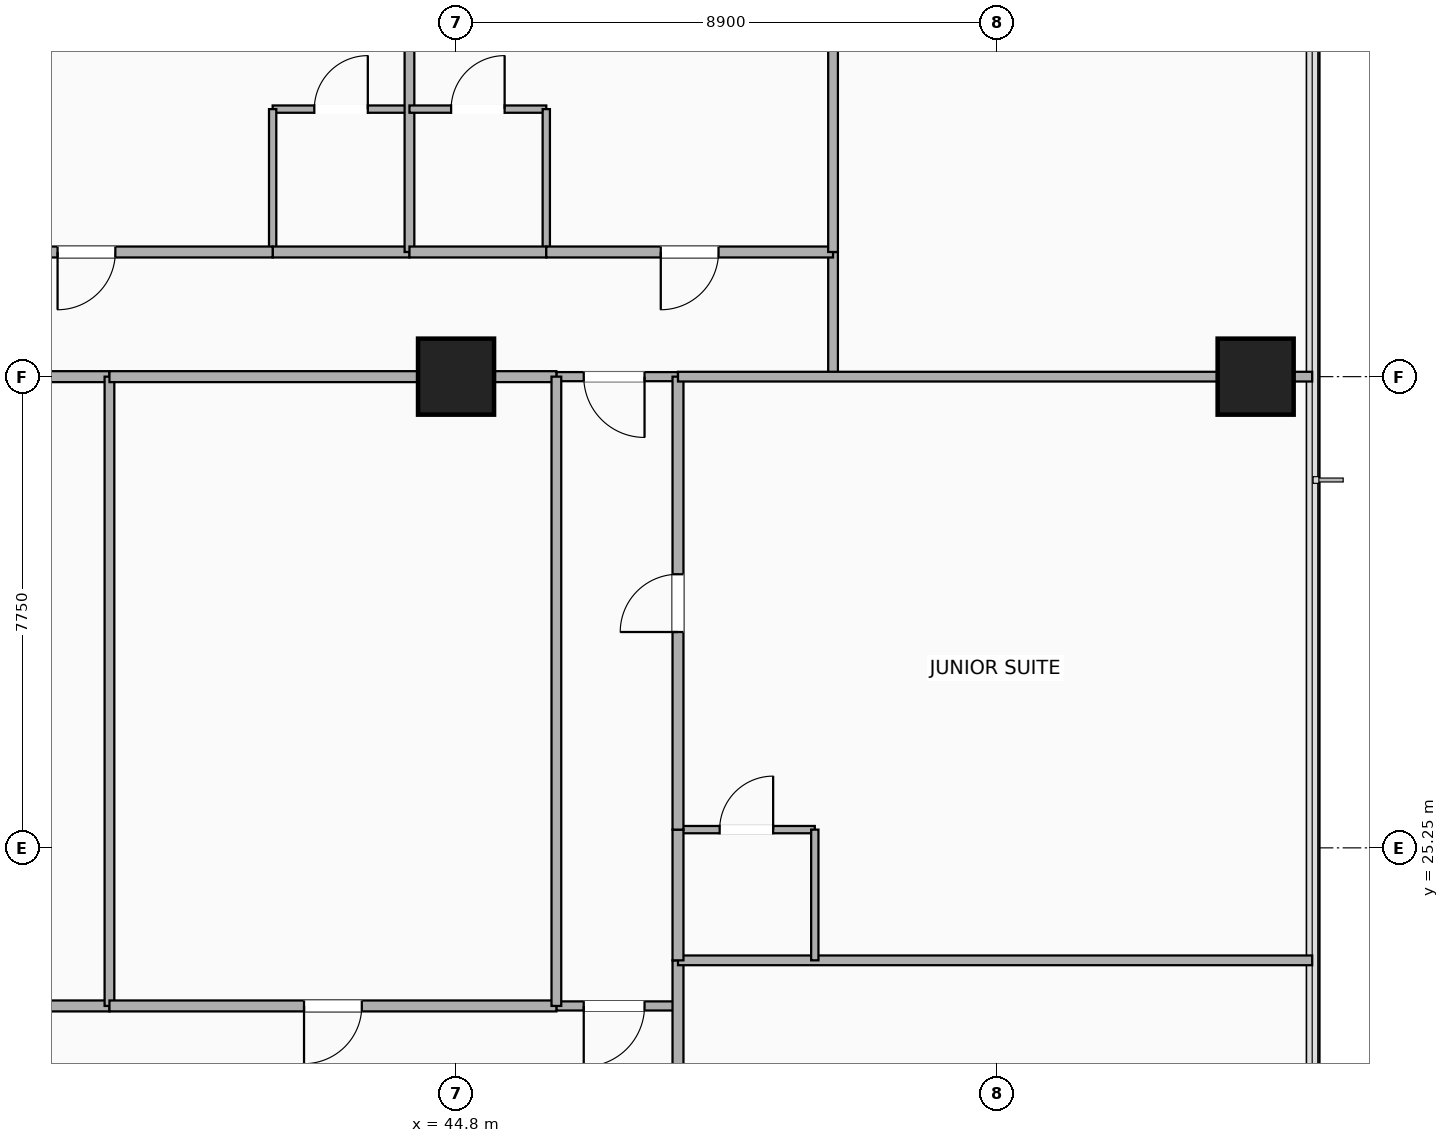
"""IFC4 building model, lengths in metres.
Left out: names, types, materials, properties, quantities, classifications, styles, units other than length and angle.
Written with IfcOpenShell. Run it as: python <this file> out.ifc"""

import sys

from ifc_helpers import new_model, si_unit, direction, frame, frame_2d, origin, origin_2d, place, context, subcontext, project, spatial, rectangle, extrude, element, fill, save


model = new_model("IFC4")
c1 = context("Model", 3, precision=1e-05, world=origin(), true_north=direction((0.0, 1.0)))
c2 = subcontext(c1, "Body", "Model", "MODEL_VIEW")
j1 = project(units=[si_unit("LENGTHUNIT", "METRE"), si_unit("PLANEANGLEUNIT", "RADIAN")], contexts=[c1])
p1 = place(None, origin())
s1 = spatial("IfcSite", under=j1, at=p1, CompositionType="ELEMENT")
p2 = place(p1, origin())
s2 = spatial("IfcBuilding", under=s1, at=p2, CompositionType="ELEMENT")
p3 = place(p2, frame((0.0, 0.0, 98.7)))
s3 = spatial("IfcBuildingStorey", under=s2, at=p3, CompositionType="ELEMENT", Elevation=98.7)
for number, where, z_axis, x_axis in (
    (1, (44.8, 33.0, -0.26), (0.0, 0.0, 1.0), (1.0, 0.0, 0.0)),
    (2, (57.95, 33.0, -0.26), (0.0, 0.0, 1.0), (1.0, 0.0, 0.0)),
):
    element("IfcColumn", number, at=place(p3, frame(where, z_axis=z_axis, x_axis=x_axis)), inside=s3, PredefinedType="COLUMN", context=c2, shape_type="SweptSolid", body=[
        extrude(rectangle(XDim=1.25, YDim=1.25, at=origin_2d()), origin(), (0.0, 0.0, 1.0), 3.5),
    ])
p4 = place(p3, frame((46.45, 22.65, 0.0), z_axis=(0.0, 0.0, 1.0), x_axis=(1.0, 0.0, 0.0)))
e3 = element("IfcWall", 3, at=p4, inside=s3, PredefinedType="PARTITIONING", context=c2, shape_type="SweptSolid", body=[
    extrude(rectangle(XDim=2.0, YDim=0.15, at=frame_2d((1.0, 0.0))), origin(), (0.0, 0.0, 1.0), 3.24),
])
p5 = place(p4, frame((0.45, 0.0, 0.0)))
e4 = element("IfcOpeningElement", 4, at=p5, cuts=e3, PredefinedType="OPENING", context=c2, shape_type="SweptSolid", body=[
    extrude(rectangle(XDim=1.0, YDim=2.15, at=frame_2d((0.5, 1.075))), frame((0.0, 0.085, 0.0), z_axis=(0.0, -1.0, 0.0), x_axis=(1.0, 0.0, 0.0)), (0.0, 0.0, 1.0), 0.17),
])
p6 = place(p3, frame((46.45, 33.0, 0.0), z_axis=(0.0, 0.0, 1.0), x_axis=(1.0, 0.0, 0.0)))
e5 = element("IfcWall", 5, at=p6, inside=s3, PredefinedType="PARTITIONING", context=c2, shape_type="SweptSolid", body=[
    extrude(rectangle(XDim=2.0, YDim=0.15, at=frame_2d((1.0, 0.0))), origin(), (0.0, 0.0, 1.0), 2.313),
])
p7 = place(p6, frame((0.45, 0.0, 0.0)))
e6 = element("IfcOpeningElement", 6, at=p7, cuts=e5, PredefinedType="OPENING", context=c2, shape_type="SweptSolid", body=[
    extrude(rectangle(XDim=1.0, YDim=2.15, at=frame_2d((0.5, 1.075))), frame((0.0, 0.085, 0.0), z_axis=(0.0, -1.0, 0.0), x_axis=(1.0, 0.0, 0.0)), (0.0, 0.0, 1.0), 0.17),
])
p8 = place(p3, frame((51.0, 33.0, 0.0), z_axis=(0.0, 0.0, 1.0), x_axis=(0.0, 1.0, 0.0)))
e7 = element("IfcWall", 7, at=p8, inside=s3, PredefinedType="PARTITIONING", context=c2, shape_type="SweptSolid", body=[
    extrude(rectangle(XDim=2.05, YDim=0.16, at=frame_2d((1.025, 0.0))), origin(), (0.0, 0.0, 1.0), 2.313),
])
p9 = place(p3, frame((33.4, 22.65, 0.0), z_axis=(0.0, 0.0, 1.0), x_axis=(1.0, 0.0, 0.0)))
e8 = element("IfcWall", 8, at=p9, inside=s3, PredefinedType="PARTITIONING", context=c2, shape_type="SweptSolid", body=[
    extrude(rectangle(XDim=5.7, YDim=0.18, at=frame_2d((2.85, 0.0))), origin(), (0.0, 0.0, 1.0), 2.313),
])
p10 = place(p9, frame((2.375, 0.0, 0.0)))
e9 = element("IfcOpeningElement", 9, at=p10, cuts=e8, PredefinedType="OPENING", context=c2, shape_type="SweptSolid", body=[
    extrude(rectangle(XDim=0.95, YDim=2.15, at=frame_2d((0.475, 1.075))), frame((0.0, 0.1, 0.0), z_axis=(0.0, -1.0, 0.0), x_axis=(1.0, 0.0, 0.0)), (0.0, 0.0, 1.0), 0.2),
])
p11 = place(p3, frame((33.4, 33.0, 0.0), z_axis=(0.0, 0.0, 1.0), x_axis=(1.0, 0.0, 0.0)))
e10 = element("IfcWall", 10, at=p11, inside=s3, PredefinedType="PARTITIONING", context=c2, shape_type="SweptSolid", body=[
    extrude(rectangle(XDim=5.7, YDim=0.18, at=frame_2d((2.85, 0.0))), origin(), (0.0, 0.0, 1.0), 2.313),
])
p12 = place(p3, frame((39.1, 22.65, 0.0), z_axis=(0.0, 0.0, 1.0), x_axis=(0.0, 1.0, 0.0)))
e11 = element("IfcWall", 11, at=p12, inside=s3, PredefinedType="PARTITIONING", context=c2, shape_type="SweptSolid", body=[
    extrude(rectangle(XDim=10.35, YDim=0.16, at=frame_2d((5.175, 0.0))), origin(), (0.0, 0.0, 1.0), 2.614),
])
p13 = place(p3, frame((39.1, 22.65, 0.0), z_axis=(0.0, 0.0, 1.0), x_axis=(1.0, 0.0, 0.0)))
e12 = element("IfcWall", 12, at=p13, inside=s3, PredefinedType="PARTITIONING", context=c2, shape_type="SweptSolid", body=[
    extrude(rectangle(XDim=7.35, YDim=0.18, at=frame_2d((3.675, 0.0))), origin(), (0.0, 0.0, 1.0), 2.313),
])
p14 = place(p13, frame((3.2, 0.0, 0.0)))
e13 = element("IfcOpeningElement", 13, at=p14, cuts=e12, PredefinedType="OPENING", context=c2, shape_type="SweptSolid", body=[
    extrude(rectangle(XDim=0.95, YDim=2.15, at=frame_2d((0.475, 1.075))), frame((0.0, 0.1, 0.0), z_axis=(0.0, -1.0, 0.0), x_axis=(1.0, 0.0, 0.0)), (0.0, 0.0, 1.0), 0.2),
])
p15 = place(p3, frame((39.1, 33.0, 0.0), z_axis=(0.0, 0.0, 1.0), x_axis=(1.0, 0.0, 0.0)))
e14 = element("IfcWall", 14, at=p15, inside=s3, PredefinedType="PARTITIONING", context=c2, shape_type="SweptSolid", body=[
    extrude(rectangle(XDim=7.35, YDim=0.18, at=frame_2d((3.675, 0.0))), origin(), (0.0, 0.0, 1.0), 2.313),
])
p16 = place(p3, frame((46.45, 22.65, 0.0), z_axis=(0.0, 0.0, 1.0), x_axis=(0.0, 1.0, 0.0)))
e15 = element("IfcWall", 15, at=p16, inside=s3, PredefinedType="PARTITIONING", context=c2, shape_type="SweptSolid", body=[
    extrude(rectangle(XDim=10.35, YDim=0.16, at=frame_2d((5.175, 0.0))), origin(), (0.0, 0.0, 1.0), 2.313),
])
p17 = place(p3, frame((41.784, 37.4, 0.0), z_axis=(0.0, 0.0, 1.0), x_axis=(1.0, 0.0, 0.0)))
e16 = element("IfcWall", 16, at=p17, inside=s3, PredefinedType="PARTITIONING", context=c2, shape_type="SweptSolid", body=[
    extrude(rectangle(XDim=2.25, YDim=0.12, at=frame_2d((1.125, 0.0))), origin(), (0.0, 0.0, 1.0), 3.24),
])
p18 = place(p17, frame((1.565, 0.0, 0.0), z_axis=(0.0, 0.0, 1.0), x_axis=(-1.0, 0.0, 0.0)))
e17 = element("IfcOpeningElement", 17, at=p18, cuts=e16, PredefinedType="OPENING", context=c2, shape_type="SweptSolid", body=[
    extrude(rectangle(XDim=0.88, YDim=2.08, at=frame_2d((0.44, 1.04))), frame((0.0, 0.07, 0.0), z_axis=(0.0, -1.0, 0.0), x_axis=(1.0, 0.0, 0.0)), (0.0, 0.0, 1.0), 0.14),
])
p19 = place(p3, frame((41.784, 35.05, 0.0), z_axis=(0.0, 0.0, 1.0), x_axis=(0.0, 1.0, 0.0)))
e18 = element("IfcWall", 18, at=p19, inside=s3, PredefinedType="PARTITIONING", context=c2, shape_type="SweptSolid", body=[
    extrude(rectangle(XDim=2.35, YDim=0.12, at=frame_2d((1.175, 0.0))), origin(), (0.0, 0.0, 1.0), 2.922),
])
p20 = place(p3, frame((41.784, 35.05, 0.0), z_axis=(0.0, 0.0, 1.0), x_axis=(1.0, 0.0, 0.0)))
e19 = element("IfcWall", 19, at=p20, inside=s3, PredefinedType="PARTITIONING", context=c2, shape_type="SweptSolid", body=[
    extrude(rectangle(XDim=2.25, YDim=0.18, at=frame_2d((1.125, 0.0))), origin(), (0.0, 0.0, 1.0), 3.24),
])
p21 = place(p3, frame((35.66, 35.05, 0.0), z_axis=(0.0, 0.0, 1.0), x_axis=(1.0, 0.0, 0.0)))
e20 = element("IfcWall", 20, at=p21, inside=s3, PredefinedType="PARTITIONING", context=c2, shape_type="SweptSolid", body=[
    extrude(rectangle(XDim=6.124, YDim=0.18, at=frame_2d((3.062, 0.0))), origin(), (0.0, 0.0, 1.0), 2.313),
])
p22 = place(p21, frame((2.587, 0.0, 0.0)))
e21 = element("IfcOpeningElement", 21, at=p22, cuts=e20, PredefinedType="OPENING", context=c2, shape_type="SweptSolid", body=[
    extrude(rectangle(XDim=0.95, YDim=2.15, at=frame_2d((0.475, 1.075))), frame((0.0, 0.1, 0.0), z_axis=(0.0, -1.0, 0.0), x_axis=(1.0, 0.0, 0.0)), (0.0, 0.0, 1.0), 0.2),
])
p23 = place(p3, frame((44.034, 35.05, 0.0), z_axis=(0.0, 0.0, 1.0), x_axis=(0.0, 1.0, 0.0)))
e22 = element("IfcWall", 22, at=p23, inside=s3, PredefinedType="PARTITIONING", context=c2, shape_type="SweptSolid", body=[
    extrude(rectangle(XDim=11.33, YDim=0.16, at=frame_2d((5.665, 0.0))), origin(), (0.0, 0.0, 1.0), 2.603),
])
p24 = place(p3, frame((44.034, 37.4, 0.0), z_axis=(0.0, 0.0, 1.0), x_axis=(1.0, 0.0, 0.0)))
e23 = element("IfcWall", 23, at=p24, inside=s3, PredefinedType="PARTITIONING", context=c2, shape_type="SweptSolid", body=[
    extrude(rectangle(XDim=2.25, YDim=0.12, at=frame_2d((1.125, 0.0))), origin(), (0.0, 0.0, 1.0), 2.313),
])
p25 = place(p24, frame((1.565, 0.0, 0.0), z_axis=(0.0, 0.0, 1.0), x_axis=(-1.0, 0.0, 0.0)))
e24 = element("IfcOpeningElement", 24, at=p25, cuts=e23, PredefinedType="OPENING", context=c2, shape_type="SweptSolid", body=[
    extrude(rectangle(XDim=0.88, YDim=2.08, at=frame_2d((0.44, 1.04))), frame((0.0, 0.07, 0.0), z_axis=(0.0, -1.0, 0.0), x_axis=(1.0, 0.0, 0.0)), (0.0, 0.0, 1.0), 0.14),
])
p26 = place(p3, frame((46.284, 35.05, 0.0), z_axis=(0.0, 0.0, 1.0), x_axis=(0.0, 1.0, 0.0)))
e25 = element("IfcWall", 25, at=p26, inside=s3, PredefinedType="PARTITIONING", context=c2, shape_type="SweptSolid", body=[
    extrude(rectangle(XDim=2.35, YDim=0.12, at=frame_2d((1.175, 0.0))), origin(), (0.0, 0.0, 1.0), 3.24),
])
p27 = place(p3, frame((44.034, 35.05, 0.0), z_axis=(0.0, 0.0, 1.0), x_axis=(1.0, 0.0, 0.0)))
e26 = element("IfcWall", 26, at=p27, inside=s3, PredefinedType="PARTITIONING", context=c2, shape_type="SweptSolid", body=[
    extrude(rectangle(XDim=2.25, YDim=0.18, at=frame_2d((1.125, 0.0))), origin(), (0.0, 0.0, 1.0), 2.313),
])
p28 = place(p3, frame((46.284, 35.05, 0.0), z_axis=(0.0, 0.0, 1.0), x_axis=(1.0, 0.0, 0.0)))
e27 = element("IfcWall", 27, at=p28, inside=s3, PredefinedType="PARTITIONING", context=c2, shape_type="SweptSolid", body=[
    extrude(rectangle(XDim=4.716, YDim=0.18, at=frame_2d((2.358, 0.0))), origin(), (0.0, 0.0, 1.0), 3.24),
])
p29 = place(p28, frame((1.883, 0.0, 0.0)))
e28 = element("IfcOpeningElement", 28, at=p29, cuts=e27, PredefinedType="OPENING", context=c2, shape_type="SweptSolid", body=[
    extrude(rectangle(XDim=0.95, YDim=2.15, at=frame_2d((0.475, 1.075))), frame((0.0, 0.1, 0.0), z_axis=(0.0, -1.0, 0.0), x_axis=(1.0, 0.0, 0.0)), (0.0, 0.0, 1.0), 0.2),
])
p30 = place(p3, frame((51.0, 35.05, 0.0), z_axis=(0.0, 0.0, 1.0), x_axis=(0.0, 1.0, 0.0)))
e29 = element("IfcWall", 29, at=p30, inside=s3, PredefinedType="PARTITIONING", context=c2, shape_type="SweptSolid", body=[
    extrude(rectangle(XDim=11.33, YDim=0.16, at=frame_2d((5.665, 0.0))), origin(), (0.0, 0.0, 1.0), 3.24),
])
p31 = place(p3, frame((48.45, 15.95, 0.0), z_axis=(0.0, 0.0, 1.0), x_axis=(0.0, 1.0, 0.0)))
e30 = element("IfcWall", 30, at=p31, inside=s3, PredefinedType="PARTITIONING", context=c2, shape_type="SweptSolid", body=[
    extrude(rectangle(XDim=7.45, YDim=0.18, at=frame_2d((3.725, 0.0))), origin(), (0.0, 0.0, 1.0), 2.313),
])
p32 = place(p31, frame((4.2, 0.0, 0.0), z_axis=(0.0, 0.0, 1.0), x_axis=(-1.0, 0.0, 0.0)))
e31 = element("IfcOpeningElement", 31, at=p32, cuts=e30, PredefinedType="OPENING", context=c2, shape_type="SweptSolid", body=[
    extrude(rectangle(XDim=0.95, YDim=2.15, at=frame_2d((0.475, 1.075))), frame((0.0, 0.1, 0.0), z_axis=(0.0, -1.0, 0.0), x_axis=(1.0, 0.0, 0.0)), (0.0, 0.0, 1.0), 0.2),
])
p33 = place(p3, frame((48.45, 23.4, 0.0), z_axis=(0.0, 0.0, 1.0), x_axis=(1.0, 0.0, 0.0)))
e32 = element("IfcWall", 32, at=p33, inside=s3, PredefinedType="PARTITIONING", context=c2, shape_type="SweptSolid", body=[
    extrude(rectangle(XDim=10.43, YDim=0.16, at=frame_2d((5.215, 0.0))), origin(), (0.0, 0.0, 1.0), 2.603),
])
p34 = place(p3, frame((48.45, 25.55, 0.0), z_axis=(0.0, 0.0, 1.0), x_axis=(1.0, 0.0, 0.0)))
e33 = element("IfcWall", 33, at=p34, inside=s3, PredefinedType="PARTITIONING", context=c2, shape_type="SweptSolid", body=[
    extrude(rectangle(XDim=2.25, YDim=0.12, at=frame_2d((1.125, 0.0))), origin(), (0.0, 0.0, 1.0), 3.24),
])
p35 = place(p34, frame((1.565, 0.0, 0.0), z_axis=(0.0, 0.0, 1.0), x_axis=(-1.0, 0.0, 0.0)))
e34 = element("IfcOpeningElement", 34, at=p35, cuts=e33, PredefinedType="OPENING", context=c2, shape_type="SweptSolid", body=[
    extrude(rectangle(XDim=0.88, YDim=2.08, at=frame_2d((0.44, 1.04))), frame((0.0, 0.07, 0.0), z_axis=(0.0, -1.0, 0.0), x_axis=(1.0, 0.0, 0.0)), (0.0, 0.0, 1.0), 0.14),
])
p36 = place(p3, frame((50.7, 23.4, 0.0), z_axis=(0.0, 0.0, 1.0), x_axis=(0.0, 1.0, 0.0)))
e35 = element("IfcWall", 35, at=p36, inside=s3, PredefinedType="PARTITIONING", context=c2, shape_type="SweptSolid", body=[
    extrude(rectangle(XDim=2.15, YDim=0.12, at=frame_2d((1.075, 0.0))), origin(), (0.0, 0.0, 1.0), 2.818),
])
p37 = place(p3, frame((48.45, 23.4, 0.0), z_axis=(0.0, 0.0, 1.0), x_axis=(0.0, 1.0, 0.0)))
e36 = element("IfcWall", 36, at=p37, inside=s3, PredefinedType="PARTITIONING", context=c2, shape_type="SweptSolid", body=[
    extrude(rectangle(XDim=2.15, YDim=0.18, at=frame_2d((1.075, 0.0))), origin(), (0.0, 0.0, 1.0), 2.818),
])
p38 = place(p3, frame((48.45, 25.55, 0.0), z_axis=(0.0, 0.0, 1.0), x_axis=(0.0, 1.0, 0.0)))
e37 = element("IfcWall", 37, at=p38, inside=s3, PredefinedType="PARTITIONING", context=c2, shape_type="SweptSolid", body=[
    extrude(rectangle(XDim=7.45, YDim=0.18, at=frame_2d((3.725, 0.0))), origin(), (0.0, 0.0, 1.0), 2.313),
])
p39 = place(p38, frame((4.2, 0.0, 0.0), z_axis=(0.0, 0.0, 1.0), x_axis=(-1.0, 0.0, 0.0)))
e38 = element("IfcOpeningElement", 38, at=p39, cuts=e37, PredefinedType="OPENING", context=c2, shape_type="SweptSolid", body=[
    extrude(rectangle(XDim=0.95, YDim=2.15, at=frame_2d((0.475, 1.075))), frame((0.0, 0.1, 0.0), z_axis=(0.0, -1.0, 0.0), x_axis=(1.0, 0.0, 0.0)), (0.0, 0.0, 1.0), 0.2),
])
p40 = place(p3, frame((48.45, 33.0, 0.0), z_axis=(0.0, 0.0, 1.0), x_axis=(1.0, 0.0, 0.0)))
e39 = element("IfcWall", 39, at=p40, inside=s3, PredefinedType="PARTITIONING", context=c2, shape_type="SweptSolid", body=[
    extrude(rectangle(XDim=10.43, YDim=0.16, at=frame_2d((5.215, 0.0))), origin(), (0.0, 0.0, 1.0), 2.313),
])
p41 = place(p5, origin())
e40 = element("IfcDoor", 40, at=p41, inside=s3, OperationType="SINGLE_SWING_LEFT", PredefinedType="DOOR", context=c2, shape_type="SweptSolid", body=[
    extrude(rectangle(XDim=1.0, YDim=2.15, at=frame_2d((0.5, 1.075))), frame((0.0, 0.025, 0.0), z_axis=(0.0, -1.0, 0.0), x_axis=(1.0, 0.0, 0.0)), (0.0, 0.0, 1.0), 0.05),
])
fill(e4, e40)
p42 = place(p7, origin())
e41 = element("IfcDoor", 41, at=p42, inside=s3, OperationType="SINGLE_SWING_RIGHT", PredefinedType="DOOR", context=c2, shape_type="SweptSolid", body=[
    extrude(rectangle(XDim=1.0, YDim=2.15, at=frame_2d((0.5, 1.075))), frame((0.0, 0.025, 0.0), z_axis=(0.0, -1.0, 0.0), x_axis=(1.0, 0.0, 0.0)), (0.0, 0.0, 1.0), 0.05),
])
fill(e6, e41)
p43 = place(p14, origin())
e42 = element("IfcDoor", 42, at=p43, inside=s3, OperationType="SINGLE_SWING_LEFT", PredefinedType="DOOR", context=c2, shape_type="SweptSolid", body=[
    extrude(rectangle(XDim=0.95, YDim=2.15, at=frame_2d((0.475, 1.075))), frame((0.0, 0.025, 0.0), z_axis=(0.0, -1.0, 0.0), x_axis=(1.0, 0.0, 0.0)), (0.0, 0.0, 1.0), 0.05),
])
fill(e13, e42)
p44 = place(p18, origin())
e43 = element("IfcDoor", 43, at=p44, inside=s3, OperationType="SINGLE_SWING_RIGHT", PredefinedType="DOOR", context=c2, shape_type="SweptSolid", body=[
    extrude(rectangle(XDim=0.88, YDim=2.08, at=frame_2d((0.44, 1.04))), frame((0.0, 0.025, 0.0), z_axis=(0.0, -1.0, 0.0), x_axis=(1.0, 0.0, 0.0)), (0.0, 0.0, 1.0), 0.05),
])
fill(e17, e43)
p45 = place(p22, origin())
e44 = element("IfcDoor", 44, at=p45, inside=s3, OperationType="SINGLE_SWING_LEFT", PredefinedType="DOOR", context=c2, shape_type="SweptSolid", body=[
    extrude(rectangle(XDim=0.95, YDim=2.15, at=frame_2d((0.475, 1.075))), frame((0.0, 0.025, 0.0), z_axis=(0.0, -1.0, 0.0), x_axis=(1.0, 0.0, 0.0)), (0.0, 0.0, 1.0), 0.05),
])
fill(e21, e44)
p46 = place(p25, origin())
e45 = element("IfcDoor", 45, at=p46, inside=s3, OperationType="SINGLE_SWING_RIGHT", PredefinedType="DOOR", context=c2, shape_type="SweptSolid", body=[
    extrude(rectangle(XDim=0.88, YDim=2.08, at=frame_2d((0.44, 1.04))), frame((0.0, 0.025, 0.0), z_axis=(0.0, -1.0, 0.0), x_axis=(1.0, 0.0, 0.0)), (0.0, 0.0, 1.0), 0.05),
])
fill(e24, e45)
p47 = place(p29, origin())
e46 = element("IfcDoor", 46, at=p47, inside=s3, OperationType="SINGLE_SWING_LEFT", PredefinedType="DOOR", context=c2, shape_type="SweptSolid", body=[
    extrude(rectangle(XDim=0.95, YDim=2.15, at=frame_2d((0.475, 1.075))), frame((0.0, 0.025, 0.0), z_axis=(0.0, -1.0, 0.0), x_axis=(1.0, 0.0, 0.0)), (0.0, 0.0, 1.0), 0.05),
])
fill(e28, e46)
p48 = place(p35, origin())
e47 = element("IfcDoor", 47, at=p48, inside=s3, OperationType="SINGLE_SWING_RIGHT", PredefinedType="DOOR", context=c2, shape_type="SweptSolid", body=[
    extrude(rectangle(XDim=0.88, YDim=2.08, at=frame_2d((0.44, 1.04))), frame((0.0, 0.025, 0.0), z_axis=(0.0, -1.0, 0.0), x_axis=(1.0, 0.0, 0.0)), (0.0, 0.0, 1.0), 0.05),
])
fill(e34, e47)
p49 = place(p39, origin())
e48 = element("IfcDoor", 48, at=p49, inside=s3, OperationType="SINGLE_SWING_LEFT", PredefinedType="DOOR", context=c2, shape_type="SweptSolid", body=[
    extrude(rectangle(XDim=0.95, YDim=2.15, at=frame_2d((0.475, 1.075))), frame((0.0, 0.025, 0.0), z_axis=(0.0, -1.0, 0.0), x_axis=(1.0, 0.0, 0.0)), (0.0, 0.0, 1.0), 0.05),
])
fill(e38, e48)
save(model, sys.argv[1])
